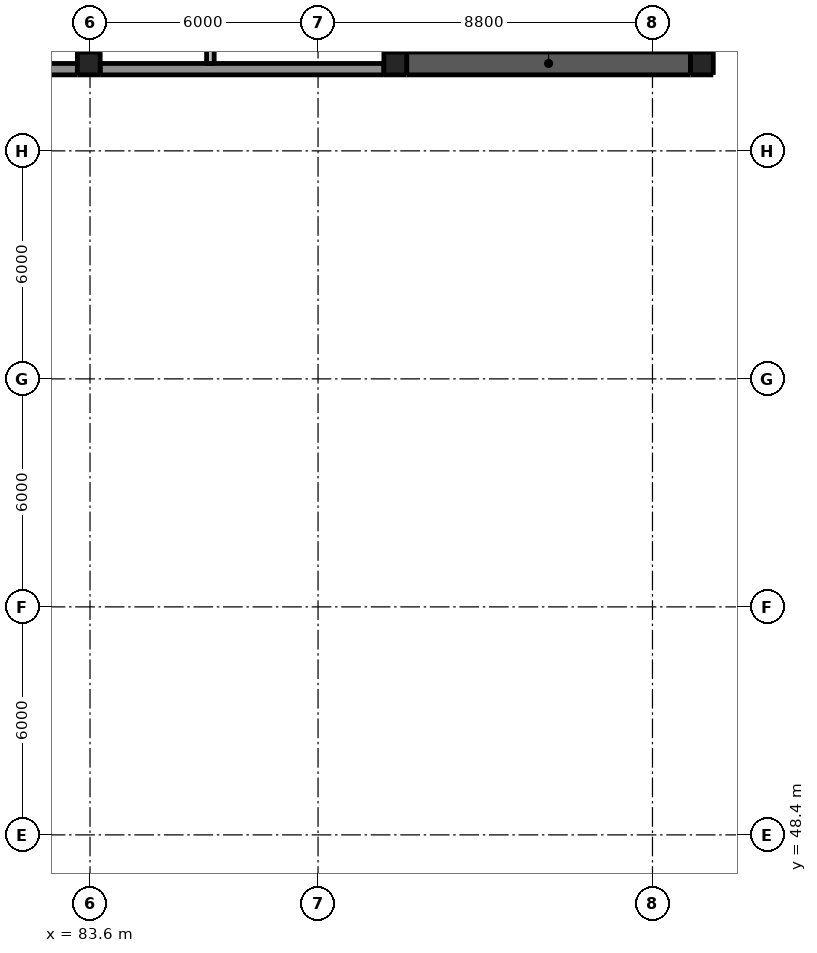
"""IFC4 building model, lengths in metres.
Left out: names, types, materials, properties, quantities, classifications, styles, units other than length and angle.
Written with IfcOpenShell. Run it as: python <this file> out.ifc"""

import sys

from ifc_helpers import new_model, si_unit, direction, frame, frame_2d, origin, origin_2d, place, context, subcontext, project, spatial, rectangle, extrude, element, fill, save


model = new_model("IFC4")
c1 = context("Model", 3, precision=1e-05, world=origin(), true_north=direction((0.0, 1.0)))
c2 = subcontext(c1, "Body", "Model", "MODEL_VIEW")
j1 = project(units=[si_unit("LENGTHUNIT", "METRE"), si_unit("PLANEANGLEUNIT", "RADIAN")], contexts=[c1])
p1 = place(None, origin())
s1 = spatial("IfcSite", under=j1, at=p1, CompositionType="ELEMENT")
p2 = place(p1, origin())
s2 = spatial("IfcBuilding", under=s1, at=p2, CompositionType="ELEMENT")
p3 = place(p2, frame((0.0, 0.0, 19.0)))
s3 = spatial("IfcBuildingStorey", under=s2, at=p3, CompositionType="ELEMENT", Elevation=19.0)
p4 = place(p3, frame((62.5, 57.05, 0.0), z_axis=(0.0, 0.0, 1.0), x_axis=(1.0, 0.0, 0.0)))
e1 = element("IfcWall", 1, at=p4, inside=s3, PredefinedType="SHEAR", context=c2, shape_type="SweptSolid", body=[
    extrude(rectangle(XDim=24.0, YDim=0.9, at=frame_2d((12.0, 0.0))), origin(), (0.0, 0.0, 1.0), 4.25),
])
p5 = place(p4, frame((20.85, 0.0, 0.0)))
e2 = element("IfcOpeningElement", 2, at=p5, cuts=e1, PredefinedType="OPENING", context=c2, shape_type="SweptSolid", body=[
    extrude(rectangle(XDim=1.1, YDim=2.1, at=frame_2d((0.55, 1.05))), frame((0.0, 0.46, 0.0), z_axis=(0.0, -1.0, 0.0), x_axis=(1.0, 0.0, 0.0)), (0.0, 0.0, 1.0), 0.92),
])
p6 = place(p4, frame((2.05, 0.0, 0.0)))
e3 = element("IfcOpeningElement", 3, at=p6, cuts=e1, PredefinedType="OPENING", context=c2, shape_type="SweptSolid", body=[
    extrude(rectangle(XDim=1.1, YDim=2.1, at=frame_2d((0.55, 1.05))), frame((0.0, 0.46, 0.0), z_axis=(0.0, -1.0, 0.0), x_axis=(1.0, 0.0, 0.0)), (0.0, 0.0, 1.0), 0.92),
])
p7 = place(p4, frame((11.55, 0.0, 0.0)))
e4 = element("IfcOpeningElement", 4, at=p7, cuts=e1, PredefinedType="OPENING", context=c2, shape_type="SweptSolid", body=[
    extrude(rectangle(XDim=0.9, YDim=2.1, at=frame_2d((0.45, 1.05))), frame((0.0, 0.46, 0.0), z_axis=(0.0, -1.0, 0.0), x_axis=(1.0, 0.0, 0.0)), (0.0, 0.0, 1.0), 0.92),
])
p8 = place(p3, frame((86.05, 33.5, 0.0), z_axis=(0.0, 0.0, 1.0), x_axis=(0.0, 1.0, 0.0)))
e5 = element("IfcWall", 5, at=p8, inside=s3, PredefinedType="SHEAR", context=c2, shape_type="SweptSolid", body=[
    extrude(rectangle(XDim=24.0, YDim=0.9, at=frame_2d((12.0, 0.0))), origin(), (0.0, 0.0, 1.0), 4.25),
])
p9 = place(p8, frame((11.2, 0.0, 0.0)))
e6 = element("IfcOpeningElement", 6, at=p9, cuts=e5, PredefinedType="OPENING", context=c2, shape_type="SweptSolid", body=[
    extrude(rectangle(XDim=1.6, YDim=2.1, at=frame_2d((0.8, 1.05))), frame((0.0, 0.46, 0.0), z_axis=(0.0, -1.0, 0.0), x_axis=(1.0, 0.0, 0.0)), (0.0, 0.0, 1.0), 0.92),
])
p10 = place(p3, frame((62.95, 50.0, 0.0), z_axis=(0.0, 0.0, 1.0), x_axis=(1.0, 0.0, 0.0)))
e7 = element("IfcWall", 7, at=p10, inside=s3, PredefinedType="SHEAR", context=c2, shape_type="SweptSolid", body=[
    extrude(rectangle(XDim=23.1, YDim=0.4, at=frame_2d((11.55, 0.0))), origin(), (0.0, 0.0, 1.0), 4.25),
])
p11 = place(p3, frame((99.4, 48.4, 0.0), z_axis=(0.0, 0.0, 1.0), x_axis=(1.0, 0.0, 0.0)))
e8 = element("IfcColumn", 8, at=p11, inside=s3, PredefinedType="COLUMN", context=c2, shape_type="SweptSolid", body=[
    extrude(rectangle(XDim=1.2, YDim=1.2, at=origin_2d()), origin(), (0.0, 0.0, 1.0), 4.5),
])
for number, where, z_axis, x_axis in (
    (9, (99.4, 54.4, 0.0), (0.0, 0.0, 1.0), (1.0, 0.0, 0.0)),
    (10, (99.4, 60.4, 0.0), (0.0, 0.0, 1.0), (1.0, 0.0, 0.0)),
    (11, (83.6, 67.4, 0.0), (0.0, 0.0, 1.0), (1.0, 0.0, 0.0)),
    (12, (89.6, 67.4, 0.0), (0.0, 0.0, 1.0), (1.0, 0.0, 0.0)),
):
    element("IfcColumn", number, at=place(p3, frame(where, z_axis=z_axis, x_axis=x_axis)), inside=s3, PredefinedType="COLUMN", context=c2, shape_type="SweptSolid", body=[
        extrude(rectangle(XDim=1.2, YDim=1.2, at=origin_2d()), origin(), (0.0, 0.0, 1.0), 4.25),
    ])
p12 = place(p3, frame((96.8, 64.8, 0.0), z_axis=(0.0, 0.0, 1.0), x_axis=(1.0, 0.0, 0.0)))
e13 = element("IfcColumn", 13, at=p12, inside=s3, PredefinedType="COLUMN", context=c2, shape_type="SweptSolid", body=[
    extrude(rectangle(XDim=3.2, YDim=3.2, at=origin_2d()), origin(), (0.0, 0.0, 1.0), 4.25),
])
for number, where, z_axis, x_axis in (
    (14, (83.567, 68.7, -0.3), (0.0, 0.0, 1.0), (1.0, 0.0, 0.0)),
    (15, (91.633, 68.7, -0.3), (0.0, 0.0, 1.0), (1.0, 0.0, 0.0)),
):
    element("IfcColumn", number, at=place(p3, frame(where, z_axis=z_axis, x_axis=x_axis)), inside=s3, PredefinedType="COLUMN", context=c2, shape_type="SweptSolid", body=[
        extrude(rectangle(XDim=0.6, YDim=0.6, at=origin_2d()), origin(), (0.0, 0.0, 1.0), 4.35),
    ])
p13 = place(p3, frame((99.7, 68.7, -0.3), z_axis=(0.0, 0.0, 1.0), x_axis=(1.0, 0.0, 0.0)))
e16 = element("IfcColumn", 16, at=p13, inside=s3, PredefinedType="COLUMN", context=c2, shape_type="SweptSolid", body=[
    extrude(rectangle(XDim=0.6, YDim=0.6, at=origin_2d()), origin(), (0.0, 0.0, 1.0), 4.8),
])
p14 = place(p3, frame((91.933, 68.7, -0.3), z_axis=(0.0, 0.0, 1.0), x_axis=(1.0, 0.0, 0.0)))
e17 = element("IfcWall", 17, at=p14, inside=s3, PredefinedType="SHEAR", context=c2, shape_type="SweptSolid", body=[
    extrude(rectangle(XDim=7.467, YDim=0.6, at=frame_2d((3.733, 0.0))), origin(), (0.0, 0.0, 1.0), 4.8),
])
for number, where, z_axis, x_axis in (
    (18, (78.2, 67.875, 0.0), (0.0, 0.0, 1.0), (1.0, 0.0, 0.0)),
    (19, (84.2, 67.875, 0.0), (0.0, 0.0, 1.0), (1.0, 0.0, 0.0)),
):
    element("IfcWall", number, at=place(p3, frame(where, z_axis=z_axis, x_axis=x_axis)), inside=s3, PredefinedType="SOLIDWALL", context=c2, shape_type="SweptSolid", body=[
        extrude(rectangle(XDim=4.8, YDim=0.25, at=frame_2d((2.4, 0.0))), origin(), (0.0, 0.0, 1.0), 4.25),
    ])
p15 = place(p3, frame((90.2, 67.875, 0.0), z_axis=(0.0, 0.0, 1.0), x_axis=(1.0, 0.0, 0.0)))
e20 = element("IfcWall", 20, at=p15, inside=s3, PredefinedType="SOLIDWALL", context=c2, shape_type="SweptSolid", body=[
    extrude(rectangle(XDim=9.8, YDim=0.25, at=frame_2d((4.9, 0.0))), origin(), (0.0, 0.0, 1.0), 4.25),
])
p16 = place(p3, frame((75.8, 68.55, 0.0), z_axis=(0.0, 0.0, 1.0), x_axis=(1.0, 0.0, 0.0)))
e21 = element("IfcWall", 21, at=p16, inside=s3, PredefinedType="SOLIDWALL", context=c2, shape_type="SweptSolid", body=[
    extrude(rectangle(XDim=7.467, YDim=0.3, at=frame_2d((3.733, 0.0))), origin(), (0.0, 0.0, 1.0), 3.15),
])
p17 = place(p3, frame((83.867, 68.55, 0.0), z_axis=(0.0, 0.0, 1.0), x_axis=(1.0, 0.0, 0.0)))
e22 = element("IfcWall", 22, at=p17, inside=s3, PredefinedType="SOLIDWALL", context=c2, shape_type="SweptSolid", body=[
    extrude(rectangle(XDim=7.466, YDim=0.3, at=frame_2d((3.733, 0.0))), origin(), (0.0, 0.0, 1.0), 3.15),
])
p18 = place(p3, frame((89.675, 48.4, 0.0), z_axis=(0.0, 0.0, 1.0), x_axis=(1.0, 0.0, 0.0)))
e23 = element("IfcWall", 23, at=p18, inside=s3, PredefinedType="PARTITIONING", context=c2, shape_type="SweptSolid", body=[
    extrude(rectangle(XDim=9.125, YDim=0.1, at=frame_2d((4.562, 0.0))), origin(), (0.0, 0.0, 1.0), 2.95),
])
p19 = place(p3, frame((89.675, 54.4, 0.0), z_axis=(0.0, 0.0, 1.0), x_axis=(1.0, 0.0, 0.0)))
e24 = element("IfcWall", 24, at=p19, inside=s3, PredefinedType="PARTITIONING", context=c2, shape_type="SweptSolid", body=[
    extrude(rectangle(XDim=9.125, YDim=0.15, at=frame_2d((4.562, 0.0))), origin(), (0.0, 0.0, 1.0), 2.944),
])
p20 = place(p3, frame((77.746, 60.4, 0.0), z_axis=(0.0, 0.0, 1.0), x_axis=(1.0, 0.0, 0.0)))
e25 = element("IfcWall", 25, at=p20, inside=s3, PredefinedType="PARTITIONING", context=c2, shape_type="SweptSolid", body=[
    extrude(rectangle(XDim=5.708, YDim=0.15, at=frame_2d((2.854, 0.0))), origin(), (0.0, 0.0, 1.0), 4.25),
])
p21 = place(p20, frame((1.954, 0.0, 0.0)))
e26 = element("IfcOpeningElement", 26, at=p21, cuts=e25, PredefinedType="OPENING", context=c2, shape_type="SweptSolid", body=[
    extrude(rectangle(XDim=1.8, YDim=2.1, at=frame_2d((0.9, 1.05))), frame((0.0, 0.085, 0.0), z_axis=(0.0, -1.0, 0.0), x_axis=(1.0, 0.0, 0.0)), (0.0, 0.0, 1.0), 0.17),
])
p22 = place(p3, frame((83.454, 60.4, 0.0), z_axis=(0.0, 0.0, 1.0), x_axis=(1.0, 0.0, 0.0)))
e27 = element("IfcWall", 27, at=p22, inside=s3, PredefinedType="PARTITIONING", context=c2, shape_type="SweptSolid", body=[
    extrude(rectangle(XDim=0.292, YDim=0.15, at=frame_2d((0.146, 0.0))), origin(), (0.0, 0.0, 1.0), 3.415),
])
p23 = place(p3, frame((83.746, 60.4, 0.0), z_axis=(0.0, 0.0, 1.0), x_axis=(1.0, 0.0, 0.0)))
e28 = element("IfcWall", 28, at=p23, inside=s3, PredefinedType="PARTITIONING", context=c2, shape_type="SweptSolid", body=[
    extrude(rectangle(XDim=5.404, YDim=0.15, at=frame_2d((2.702, 0.0))), origin(), (0.0, 0.0, 1.0), 4.25),
])
p24 = place(p23, frame((2.354, 0.0, 0.0)))
e29 = element("IfcOpeningElement", 29, at=p24, cuts=e28, PredefinedType="OPENING", context=c2, shape_type="SweptSolid", body=[
    extrude(rectangle(XDim=1.0, YDim=2.1, at=frame_2d((0.5, 1.05))), frame((0.0, 0.085, 0.0), z_axis=(0.0, -1.0, 0.0), x_axis=(1.0, 0.0, 0.0)), (0.0, 0.0, 1.0), 0.17),
])
p25 = place(p3, frame((89.15, 60.4, 0.0), z_axis=(0.0, 0.0, 1.0), x_axis=(1.0, 0.0, 0.0)))
e30 = element("IfcWall", 30, at=p25, inside=s3, PredefinedType="PARTITIONING", context=c2, shape_type="SweptSolid", body=[
    extrude(rectangle(XDim=0.9, YDim=0.15, at=frame_2d((0.45, 0.0))), origin(), (0.0, 0.0, 1.0), 2.947),
])
p26 = place(p3, frame((90.05, 60.4, 0.0), z_axis=(0.0, 0.0, 1.0), x_axis=(1.0, 0.0, 0.0)))
e31 = element("IfcWall", 31, at=p26, inside=s3, PredefinedType="PARTITIONING", context=c2, shape_type="SweptSolid", body=[
    extrude(rectangle(XDim=8.75, YDim=0.15, at=frame_2d((4.375, 0.0))), origin(), (0.0, 0.0, 1.0), 3.415),
])
p27 = place(p3, frame((83.6, 60.475, 0.0), z_axis=(0.0, 0.0, 1.0), x_axis=(0.0, 1.0, 0.0)))
e32 = element("IfcWall", 32, at=p27, inside=s3, PredefinedType="PARTITIONING", context=c2, shape_type="SweptSolid", body=[
    extrude(rectangle(XDim=6.325, YDim=0.1, at=frame_2d((3.163, 0.0))), origin(), (0.0, 0.0, 1.0), 3.415),
])
p28 = place(p3, frame((89.6, 42.85, 0.0), z_axis=(0.0, 0.0, 1.0), x_axis=(0.0, 1.0, 0.0)))
e33 = element("IfcWall", 33, at=p28, inside=s3, PredefinedType="PARTITIONING", context=c2, shape_type="SweptSolid", body=[
    extrude(rectangle(XDim=5.1, YDim=0.15, at=frame_2d((2.55, 0.0))), origin(), (0.0, 0.0, 1.0), 4.25),
])
p29 = place(p3, frame((89.6, 47.95, 0.0), z_axis=(0.0, 0.0, 1.0), x_axis=(0.0, 1.0, 0.0)))
e34 = element("IfcWall", 34, at=p29, inside=s3, PredefinedType="PARTITIONING", context=c2, shape_type="SweptSolid", body=[
    extrude(rectangle(XDim=0.9, YDim=0.15, at=frame_2d((0.45, 0.0))), origin(), (0.0, 0.0, 1.0), 2.95),
])
p30 = place(p3, frame((89.6, 48.85, 0.0), z_axis=(0.0, 0.0, 1.0), x_axis=(0.0, 1.0, 0.0)))
e35 = element("IfcWall", 35, at=p30, inside=s3, PredefinedType="PARTITIONING", context=c2, shape_type="SweptSolid", body=[
    extrude(rectangle(XDim=5.1, YDim=0.15, at=frame_2d((2.55, 0.0))), origin(), (0.0, 0.0, 1.0), 4.25),
])
p31 = place(p30, frame((2.05, 0.0, 0.0)))
e36 = element("IfcOpeningElement", 36, at=p31, cuts=e35, PredefinedType="OPENING", context=c2, shape_type="SweptSolid", body=[
    extrude(rectangle(XDim=1.0, YDim=2.1, at=frame_2d((0.5, 1.05))), frame((0.0, 0.085, 0.0), z_axis=(0.0, -1.0, 0.0), x_axis=(1.0, 0.0, 0.0)), (0.0, 0.0, 1.0), 0.17),
])
p32 = place(p3, frame((89.6, 53.95, 0.0), z_axis=(0.0, 0.0, 1.0), x_axis=(0.0, 1.0, 0.0)))
e37 = element("IfcWall", 37, at=p32, inside=s3, PredefinedType="PARTITIONING", context=c2, shape_type="SweptSolid", body=[
    extrude(rectangle(XDim=0.895, YDim=0.15, at=frame_2d((0.448, 0.0))), origin(), (0.0, 0.0, 1.0), 2.944),
])
p33 = place(p3, frame((89.6, 54.85, 0.0), z_axis=(0.0, 0.0, 1.0), x_axis=(0.0, 1.0, 0.0)))
e38 = element("IfcWall", 38, at=p33, inside=s3, PredefinedType="PARTITIONING", context=c2, shape_type="SweptSolid", body=[
    extrude(rectangle(XDim=5.475, YDim=0.15, at=frame_2d((2.737, 0.0))), origin(), (0.0, 0.0, 1.0), 2.947),
])
p34 = place(p33, frame((1.95, 0.0, 0.0)))
e39 = element("IfcOpeningElement", 39, at=p34, cuts=e38, PredefinedType="OPENING", context=c2, shape_type="SweptSolid", body=[
    extrude(rectangle(XDim=1.2, YDim=2.1, at=frame_2d((0.6, 1.05))), frame((0.0, 0.085, 0.0), z_axis=(0.0, -1.0, 0.0), x_axis=(1.0, 0.0, 0.0)), (0.0, 0.0, 1.0), 0.17),
])
p35 = place(p3, frame((86.767, 68.7, 0.0), z_axis=(0.0, 0.0, 1.0), x_axis=(0.0, 1.0, 0.0)))
e40 = element("IfcWall", 40, at=p35, inside=s3, PredefinedType="PARTITIONING", context=c2, shape_type="SweptSolid", body=[
    extrude(rectangle(XDim=5.2, YDim=0.2, at=frame_2d((2.6, 0.0))), origin(), (0.0, 0.0, 1.0), 2.85),
])
p36 = place(p5, origin())
e41 = element("IfcDoor", 41, at=p36, inside=s3, OperationType="SINGLE_SWING_RIGHT", PredefinedType="DOOR", context=c2, shape_type="SweptSolid", body=[
    extrude(rectangle(XDim=1.1, YDim=2.1, at=frame_2d((0.55, 1.05))), frame((0.0, -0.388, 0.0), z_axis=(0.0, -1.0, 0.0), x_axis=(1.0, 0.0, 0.0)), (0.0, 0.0, 1.0), 0.05),
])
fill(e2, e41)
p37 = place(p24, origin())
e42 = element("IfcDoor", 42, at=p37, inside=s3, OperationType="SINGLE_SWING_LEFT", PredefinedType="DOOR", context=c2, shape_type="SweptSolid", body=[
    extrude(rectangle(XDim=1.0, YDim=2.1, at=frame_2d((0.5, 1.05))), frame((0.0, 0.025, 0.0), z_axis=(0.0, -1.0, 0.0), x_axis=(1.0, 0.0, 0.0)), (0.0, 0.0, 1.0), 0.05),
])
fill(e29, e42)
p38 = place(p31, origin())
e43 = element("IfcDoor", 43, at=p38, inside=s3, OperationType="SINGLE_SWING_LEFT", PredefinedType="DOOR", context=c2, shape_type="SweptSolid", body=[
    extrude(rectangle(XDim=1.0, YDim=2.1, at=frame_2d((0.5, 1.05))), frame((0.0, 0.025, 0.0), z_axis=(0.0, -1.0, 0.0), x_axis=(1.0, 0.0, 0.0)), (0.0, 0.0, 1.0), 0.05),
])
fill(e36, e43)
p39 = place(p34, origin())
e44 = element("IfcDoor", 44, at=p39, inside=s3, OperationType="SINGLE_SWING_LEFT", PredefinedType="DOOR", context=c2, shape_type="SweptSolid", body=[
    extrude(rectangle(XDim=1.2, YDim=2.1, at=frame_2d((0.6, 1.05))), frame((0.0, 0.025, 0.0), z_axis=(0.0, -1.0, 0.0), x_axis=(1.0, 0.0, 0.0)), (0.0, 0.0, 1.0), 0.05),
])
fill(e39, e44)
save(model, sys.argv[1])
